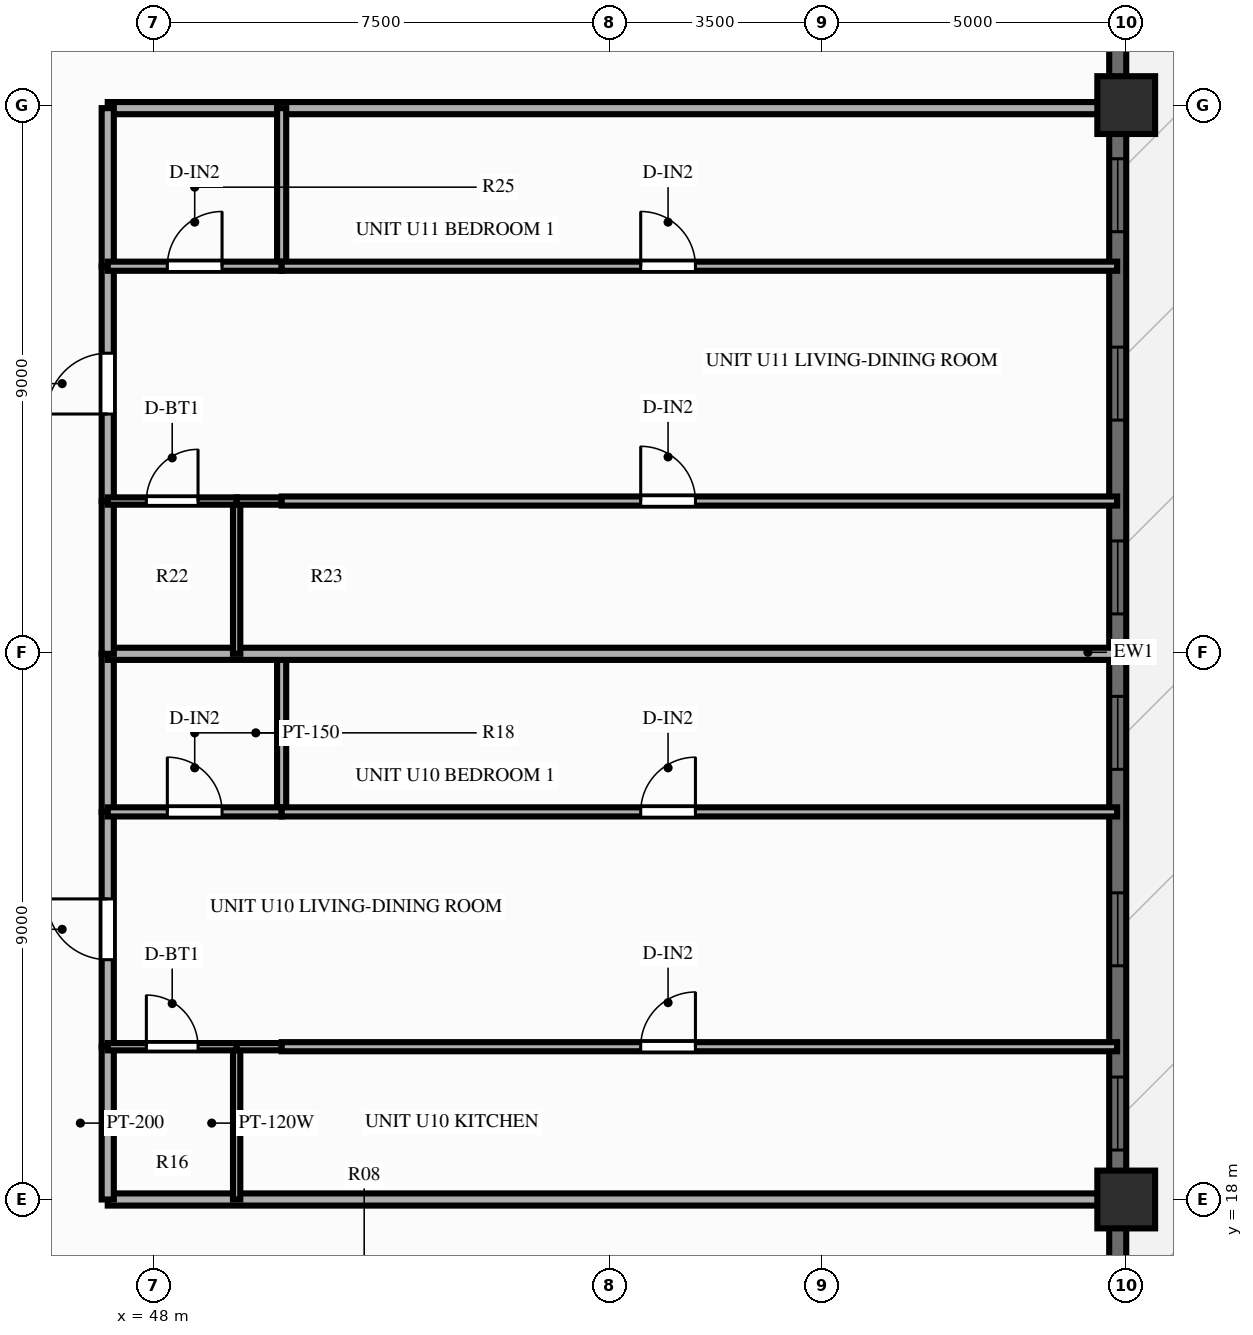
"""IFC4 building model, lengths in metres.
Left out: names, types, materials, properties, quantities, classifications, styles, units other than length and angle.
Written with IfcOpenShell. Run it as: python <this file> out.ifc"""

import sys

from ifc_helpers import new_model, si_unit, direction, frame, frame_2d, origin, origin_2d, place, context, subcontext, project, spatial, rectangle, extrude, source, transform, mapped, element, fill, save


model = new_model("IFC4")
c1 = context("Model", 3, precision=1e-05, world=origin(), true_north=direction((0.0, 1.0)))
c2 = subcontext(c1, "Body", "Model", "MODEL_VIEW")
j1 = project(units=[si_unit("LENGTHUNIT", "METRE"), si_unit("PLANEANGLEUNIT", "RADIAN")], contexts=[c1])
p1 = place(None, origin())
s1 = spatial("IfcSite", under=j1, at=p1, CompositionType="ELEMENT")
p2 = place(p1, origin())
s2 = spatial("IfcBuilding", under=s1, at=p2, CompositionType="ELEMENT")
p3 = place(p2, frame((0.0, 0.0, 77.85)))
s3 = spatial("IfcBuildingStorey", under=s2, at=p3, CompositionType="ELEMENT", Elevation=77.85)
m1 = source(origin(), c2, "Body", "SweptSolid", [
    extrude(rectangle(XDim=0.95, YDim=0.95, at=origin_2d()), origin(), (0.0, 0.0, 1.0), 3.0),
])
for number, where, z_axis, x_axis in (
    (1, (64.0, 18.0, 0.0), (0.0, 0.0, 1.0), (1.0, 0.0, 0.0)),
    (2, (64.0, 36.0, 0.0), (0.0, 0.0, 1.0), (1.0, 0.0, 0.0)),
):
    element("IfcColumn", number, at=place(p3, frame(where, z_axis=z_axis, x_axis=x_axis)), inside=s3, PredefinedType="COLUMN", context=c2, shape_type="MappedRepresentation", body=[
        mapped(m1, transform((0.0, 0.0, 0.0), scale=1.0)),
    ])
p4 = place(p3, frame((63.86, 7.2, 0.0), z_axis=(0.0, 0.0, 1.0), x_axis=(0.0, 1.0, 0.0)))
e3 = element("IfcWall", 3, at=p4, inside=s3, PredefinedType="SOLIDWALL", context=c2, shape_type="SweptSolid", body=[
    extrude(rectangle(XDim=39.6, YDim=0.28, at=frame_2d((19.8, 0.0))), origin(), (0.0, 0.0, 1.0), 2.28),
])
p5 = place(p4, frame((6.2, 0.0, 0.0), z_axis=(0.0, 0.0, 1.0), x_axis=(-1.0, 0.0, 0.0)))
e4 = element("IfcOpeningElement", 4, at=p5, cuts=e3, PredefinedType="OPENING", context=c2, shape_type="SweptSolid", body=[
    extrude(rectangle(XDim=1.6, YDim=2.15, at=frame_2d((0.8, 1.075))), frame((0.0, 0.152, 0.0), z_axis=(0.0, -1.0, 0.0), x_axis=(1.0, 0.0, 0.0)), (0.0, 0.0, 1.0), 0.304),
])
p6 = place(p4, frame((11.614, 0.0, 0.25)))
e5 = element("IfcOpeningElement", 5, at=p6, cuts=e3, PredefinedType="OPENING", context=c2, shape_type="SweptSolid", body=[
    extrude(rectangle(XDim=1.2, YDim=1.5, at=frame_2d((0.6, 0.75))), frame((0.0, 0.152, 0.0), z_axis=(0.0, -1.0, 0.0), x_axis=(1.0, 0.0, 0.0)), (0.0, 0.0, 1.0), 0.304),
])
p7 = place(p4, frame((14.644, 0.0, 0.25)))
e6 = element("IfcOpeningElement", 6, at=p7, cuts=e3, PredefinedType="OPENING", context=c2, shape_type="SweptSolid", body=[
    extrude(rectangle(XDim=1.2, YDim=1.5, at=frame_2d((0.6, 0.75))), frame((0.0, 0.152, 0.0), z_axis=(0.0, -1.0, 0.0), x_axis=(1.0, 0.0, 0.0)), (0.0, 0.0, 1.0), 0.304),
])
p8 = place(p4, frame((17.875, 0.0, 0.25)))
e7 = element("IfcOpeningElement", 7, at=p8, cuts=e3, PredefinedType="OPENING", context=c2, shape_type="SweptSolid", body=[
    extrude(rectangle(XDim=1.2, YDim=1.5, at=frame_2d((0.6, 0.75))), frame((0.0, 0.152, 0.0), z_axis=(0.0, -1.0, 0.0), x_axis=(1.0, 0.0, 0.0)), (0.0, 0.0, 1.0), 0.304),
])
p9 = place(p4, frame((20.431, 0.0, 0.25)))
e8 = element("IfcOpeningElement", 8, at=p9, cuts=e3, PredefinedType="OPENING", context=c2, shape_type="SweptSolid", body=[
    extrude(rectangle(XDim=1.2, YDim=1.5, at=frame_2d((0.6, 0.75))), frame((0.0, 0.152, 0.0), z_axis=(0.0, -1.0, 0.0), x_axis=(1.0, 0.0, 0.0)), (0.0, 0.0, 1.0), 0.304),
])
p10 = place(p4, frame((23.619, 0.0, 0.25)))
e9 = element("IfcOpeningElement", 9, at=p10, cuts=e3, PredefinedType="OPENING", context=c2, shape_type="SweptSolid", body=[
    extrude(rectangle(XDim=1.2, YDim=1.5, at=frame_2d((0.6, 0.75))), frame((0.0, 0.152, 0.0), z_axis=(0.0, -1.0, 0.0), x_axis=(1.0, 0.0, 0.0)), (0.0, 0.0, 1.0), 0.304),
])
p11 = place(p4, frame((26.718, 0.0, 0.25)))
e10 = element("IfcOpeningElement", 10, at=p11, cuts=e3, PredefinedType="OPENING", context=c2, shape_type="SweptSolid", body=[
    extrude(rectangle(XDim=1.2, YDim=1.5, at=frame_2d((0.6, 0.75))), frame((0.0, 0.152, 0.0), z_axis=(0.0, -1.0, 0.0), x_axis=(1.0, 0.0, 0.0)), (0.0, 0.0, 1.0), 0.304),
])
p12 = place(p4, frame((33.6, 0.0, 0.25)))
e11 = element("IfcOpeningElement", 11, at=p12, cuts=e3, PredefinedType="OPENING", context=c2, shape_type="SweptSolid", body=[
    extrude(rectangle(XDim=1.2, YDim=1.5, at=frame_2d((0.6, 0.75))), frame((0.0, 0.152, 0.0), z_axis=(0.0, -1.0, 0.0), x_axis=(1.0, 0.0, 0.0)), (0.0, 0.0, 1.0), 0.304),
])
for number, where, z_axis, x_axis in (
    (12, (47.25, 18.0, 0.0), (0.0, 0.0, 1.0), (1.0, 0.0, 0.0)),
    (13, (47.25, 35.95, 0.0), (0.0, 0.0, 1.0), (1.0, 0.0, 0.0)),
):
    element("IfcWall", number, at=place(p3, frame(where, z_axis=z_axis, x_axis=x_axis)), inside=s3, PredefinedType="PARTITIONING", context=c2, shape_type="SweptSolid", body=[
        extrude(rectangle(XDim=16.6, YDim=0.2, at=frame_2d((8.3, 0.0))), origin(), (0.0, 0.0, 1.0), 2.34),
    ])
p13 = place(p3, frame((47.25, 18.0, 0.0), z_axis=(0.0, 0.0, 1.0), x_axis=(0.0, 1.0, 0.0)))
e14 = element("IfcWall", 14, at=p13, inside=s3, PredefinedType="PARTITIONING", context=c2, shape_type="SweptSolid", body=[
    extrude(rectangle(XDim=2.513, YDim=0.2, at=frame_2d((1.256, 0.0))), origin(), (0.0, 0.0, 1.0), 2.79),
])
p14 = place(p3, frame((47.25, 20.513, 0.0), z_axis=(0.0, 0.0, 1.0), x_axis=(0.0, 1.0, 0.0)))
e15 = element("IfcWall", 15, at=p14, inside=s3, PredefinedType="PARTITIONING", context=c2, shape_type="SweptSolid", body=[
    extrude(rectangle(XDim=3.862, YDim=0.2, at=frame_2d((1.931, 0.0))), origin(), (0.0, 0.0, 1.0), 2.79),
])
p15 = place(p14, frame((1.431, 0.0, 0.0)))
e16 = element("IfcOpeningElement", 16, at=p15, cuts=e15, PredefinedType="OPENING", context=c2, shape_type="SweptSolid", body=[
    extrude(rectangle(XDim=1.0, YDim=2.15, at=frame_2d((0.5, 1.075))), frame((0.0, 0.112, 0.0), z_axis=(0.0, -1.0, 0.0), x_axis=(1.0, 0.0, 0.0)), (0.0, 0.0, 1.0), 0.224),
])
p16 = place(p3, frame((47.25, 24.375, 0.0), z_axis=(0.0, 0.0, 1.0), x_axis=(0.0, 1.0, 0.0)))
e17 = element("IfcWall", 17, at=p16, inside=s3, PredefinedType="PARTITIONING", context=c2, shape_type="SweptSolid", body=[
    extrude(rectangle(XDim=2.6, YDim=0.2, at=frame_2d((1.3, 0.0))), origin(), (0.0, 0.0, 1.0), 2.79),
])
p17 = place(p3, frame((49.37, 18.0, 0.0), z_axis=(0.0, 0.0, 1.0), x_axis=(0.0, 1.0, 0.0)))
e18 = element("IfcWall", 18, at=p17, inside=s3, PredefinedType="PARTITIONING", context=c2, shape_type="SweptSolid", body=[
    extrude(rectangle(XDim=2.513, YDim=0.12, at=frame_2d((1.256, 0.0))), origin(), (0.0, 0.0, 1.0), 2.79),
])
p18 = place(p3, frame((50.11, 24.375, 0.0), z_axis=(0.0, 0.0, 1.0), x_axis=(0.0, 1.0, 0.0)))
e19 = element("IfcWall", 19, at=p18, inside=s3, PredefinedType="PARTITIONING", context=c2, shape_type="SweptSolid", body=[
    extrude(rectangle(XDim=2.6, YDim=0.15, at=frame_2d((1.3, 0.0))), origin(), (0.0, 0.0, 1.0), 2.79),
])
p19 = place(p3, frame((47.25, 20.513, 0.0), z_axis=(0.0, 0.0, 1.0), x_axis=(1.0, 0.0, 0.0)))
e20 = element("IfcWall", 20, at=p19, inside=s3, PredefinedType="PARTITIONING", context=c2, shape_type="SweptSolid", body=[
    extrude(rectangle(XDim=2.12, YDim=0.12, at=frame_2d((1.06, 0.0))), origin(), (0.0, 0.0, 1.0), 2.79),
])
p20 = place(p19, frame((0.635, 0.0, 0.0)))
e21 = element("IfcOpeningElement", 21, at=p20, cuts=e20, PredefinedType="OPENING", context=c2, shape_type="SweptSolid", body=[
    extrude(rectangle(XDim=0.85, YDim=2.05, at=frame_2d((0.425, 1.025))), frame((0.0, 0.072, 0.0), z_axis=(0.0, -1.0, 0.0), x_axis=(1.0, 0.0, 0.0)), (0.0, 0.0, 1.0), 0.144),
])
p21 = place(p3, frame((49.37, 20.513, 0.0), z_axis=(0.0, 0.0, 1.0), x_axis=(1.0, 0.0, 0.0)))
e22 = element("IfcWall", 22, at=p21, inside=s3, PredefinedType="PARTITIONING", context=c2, shape_type="SweptSolid", body=[
    extrude(rectangle(XDim=0.74, YDim=0.12, at=frame_2d((0.37, 0.0))), origin(), (0.0, 0.0, 1.0), 2.79),
])
p22 = place(p3, frame((50.11, 20.513, 0.0), z_axis=(0.0, 0.0, 1.0), x_axis=(1.0, 0.0, 0.0)))
e23 = element("IfcWall", 23, at=p22, inside=s3, PredefinedType="PARTITIONING", context=c2, shape_type="SweptSolid", body=[
    extrude(rectangle(XDim=13.74, YDim=0.15, at=frame_2d((6.87, 0.0))), origin(), (0.0, 0.0, 1.0), 2.79),
])
p23 = place(p22, frame((5.905, 0.0, 0.0)))
e24 = element("IfcOpeningElement", 24, at=p23, cuts=e23, PredefinedType="OPENING", context=c2, shape_type="SweptSolid", body=[
    extrude(rectangle(XDim=0.9, YDim=2.1, at=frame_2d((0.45, 1.05))), frame((0.0, 0.087, 0.0), z_axis=(0.0, -1.0, 0.0), x_axis=(1.0, 0.0, 0.0)), (0.0, 0.0, 1.0), 0.174),
])
p24 = place(p3, frame((47.25, 24.375, 0.0), z_axis=(0.0, 0.0, 1.0), x_axis=(1.0, 0.0, 0.0)))
e25 = element("IfcWall", 25, at=p24, inside=s3, PredefinedType="PARTITIONING", context=c2, shape_type="SweptSolid", body=[
    extrude(rectangle(XDim=2.86, YDim=0.15, at=frame_2d((1.43, 0.0))), origin(), (0.0, 0.0, 1.0), 2.79),
])
p25 = place(p24, frame((0.98, 0.0, 0.0)))
e26 = element("IfcOpeningElement", 26, at=p25, cuts=e25, PredefinedType="OPENING", context=c2, shape_type="SweptSolid", body=[
    extrude(rectangle(XDim=0.9, YDim=2.1, at=frame_2d((0.45, 1.05))), frame((0.0, 0.087, 0.0), z_axis=(0.0, -1.0, 0.0), x_axis=(1.0, 0.0, 0.0)), (0.0, 0.0, 1.0), 0.174),
])
p26 = place(p3, frame((50.11, 24.375, 0.0), z_axis=(0.0, 0.0, 1.0), x_axis=(1.0, 0.0, 0.0)))
e27 = element("IfcWall", 27, at=p26, inside=s3, PredefinedType="PARTITIONING", context=c2, shape_type="SweptSolid", body=[
    extrude(rectangle(XDim=13.74, YDim=0.15, at=frame_2d((6.87, 0.0))), origin(), (0.0, 0.0, 1.0), 2.79),
])
p27 = place(p26, frame((5.905, 0.0, 0.0)))
e28 = element("IfcOpeningElement", 28, at=p27, cuts=e27, PredefinedType="OPENING", context=c2, shape_type="SweptSolid", body=[
    extrude(rectangle(XDim=0.9, YDim=2.1, at=frame_2d((0.45, 1.05))), frame((0.0, 0.087, 0.0), z_axis=(0.0, -1.0, 0.0), x_axis=(1.0, 0.0, 0.0)), (0.0, 0.0, 1.0), 0.174),
])
p28 = place(p3, frame((47.25, 26.975, 0.0), z_axis=(0.0, 0.0, 1.0), x_axis=(1.0, 0.0, 0.0)))
e29 = element("IfcWall", 29, at=p28, inside=s3, PredefinedType="PARTITIONING", context=c2, shape_type="SweptSolid", body=[
    extrude(rectangle(XDim=16.6, YDim=0.2, at=frame_2d((8.3, 0.0))), origin(), (0.0, 0.0, 1.0), 2.79),
])
p29 = place(p3, frame((47.25, 26.975, 0.0), z_axis=(0.0, 0.0, 1.0), x_axis=(0.0, 1.0, 0.0)))
e30 = element("IfcWall", 30, at=p29, inside=s3, PredefinedType="PARTITIONING", context=c2, shape_type="SweptSolid", body=[
    extrude(rectangle(XDim=2.513, YDim=0.2, at=frame_2d((1.256, 0.0))), origin(), (0.0, 0.0, 1.0), 2.79),
])
p30 = place(p3, frame((47.25, 29.488, 0.0), z_axis=(0.0, 0.0, 1.0), x_axis=(0.0, 1.0, 0.0)))
e31 = element("IfcWall", 31, at=p30, inside=s3, PredefinedType="PARTITIONING", context=c2, shape_type="SweptSolid", body=[
    extrude(rectangle(XDim=3.862, YDim=0.2, at=frame_2d((1.931, 0.0))), origin(), (0.0, 0.0, 1.0), 2.79),
])
p31 = place(p30, frame((1.431, 0.0, 0.0)))
e32 = element("IfcOpeningElement", 32, at=p31, cuts=e31, PredefinedType="OPENING", context=c2, shape_type="SweptSolid", body=[
    extrude(rectangle(XDim=1.0, YDim=2.15, at=frame_2d((0.5, 1.075))), frame((0.0, 0.112, 0.0), z_axis=(0.0, -1.0, 0.0), x_axis=(1.0, 0.0, 0.0)), (0.0, 0.0, 1.0), 0.224),
])
p32 = place(p3, frame((47.25, 33.35, 0.0), z_axis=(0.0, 0.0, 1.0), x_axis=(0.0, 1.0, 0.0)))
e33 = element("IfcWall", 33, at=p32, inside=s3, PredefinedType="PARTITIONING", context=c2, shape_type="SweptSolid", body=[
    extrude(rectangle(XDim=2.6, YDim=0.2, at=frame_2d((1.3, 0.0))), origin(), (0.0, 0.0, 1.0), 2.79),
])
p33 = place(p3, frame((49.37, 26.975, 0.0), z_axis=(0.0, 0.0, 1.0), x_axis=(0.0, 1.0, 0.0)))
e34 = element("IfcWall", 34, at=p33, inside=s3, PredefinedType="PARTITIONING", context=c2, shape_type="SweptSolid", body=[
    extrude(rectangle(XDim=2.513, YDim=0.12, at=frame_2d((1.256, 0.0))), origin(), (0.0, 0.0, 1.0), 2.79),
])
p34 = place(p3, frame((50.11, 33.35, 0.0), z_axis=(0.0, 0.0, 1.0), x_axis=(0.0, 1.0, 0.0)))
e35 = element("IfcWall", 35, at=p34, inside=s3, PredefinedType="PARTITIONING", context=c2, shape_type="SweptSolid", body=[
    extrude(rectangle(XDim=2.6, YDim=0.15, at=frame_2d((1.3, 0.0))), origin(), (0.0, 0.0, 1.0), 2.79),
])
p35 = place(p3, frame((47.25, 29.488, 0.0), z_axis=(0.0, 0.0, 1.0), x_axis=(1.0, 0.0, 0.0)))
e36 = element("IfcWall", 36, at=p35, inside=s3, PredefinedType="PARTITIONING", context=c2, shape_type="SweptSolid", body=[
    extrude(rectangle(XDim=2.12, YDim=0.12, at=frame_2d((1.06, 0.0))), origin(), (0.0, 0.0, 1.0), 2.79),
])
p36 = place(p35, frame((0.635, 0.0, 0.0)))
e37 = element("IfcOpeningElement", 37, at=p36, cuts=e36, PredefinedType="OPENING", context=c2, shape_type="SweptSolid", body=[
    extrude(rectangle(XDim=0.85, YDim=2.05, at=frame_2d((0.425, 1.025))), frame((0.0, 0.072, 0.0), z_axis=(0.0, -1.0, 0.0), x_axis=(1.0, 0.0, 0.0)), (0.0, 0.0, 1.0), 0.144),
])
p37 = place(p3, frame((49.37, 29.488, 0.0), z_axis=(0.0, 0.0, 1.0), x_axis=(1.0, 0.0, 0.0)))
e38 = element("IfcWall", 38, at=p37, inside=s3, PredefinedType="PARTITIONING", context=c2, shape_type="SweptSolid", body=[
    extrude(rectangle(XDim=0.74, YDim=0.12, at=frame_2d((0.37, 0.0))), origin(), (0.0, 0.0, 1.0), 2.79),
])
p38 = place(p3, frame((50.11, 29.488, 0.0), z_axis=(0.0, 0.0, 1.0), x_axis=(1.0, 0.0, 0.0)))
e39 = element("IfcWall", 39, at=p38, inside=s3, PredefinedType="PARTITIONING", context=c2, shape_type="SweptSolid", body=[
    extrude(rectangle(XDim=13.74, YDim=0.15, at=frame_2d((6.87, 0.0))), origin(), (0.0, 0.0, 1.0), 2.79),
])
p39 = place(p38, frame((5.905, 0.0, 0.0)))
e40 = element("IfcOpeningElement", 40, at=p39, cuts=e39, PredefinedType="OPENING", context=c2, shape_type="SweptSolid", body=[
    extrude(rectangle(XDim=0.9, YDim=2.1, at=frame_2d((0.45, 1.05))), frame((0.0, 0.087, 0.0), z_axis=(0.0, -1.0, 0.0), x_axis=(1.0, 0.0, 0.0)), (0.0, 0.0, 1.0), 0.174),
])
p40 = place(p3, frame((47.25, 33.35, 0.0), z_axis=(0.0, 0.0, 1.0), x_axis=(1.0, 0.0, 0.0)))
e41 = element("IfcWall", 41, at=p40, inside=s3, PredefinedType="PARTITIONING", context=c2, shape_type="SweptSolid", body=[
    extrude(rectangle(XDim=2.86, YDim=0.15, at=frame_2d((1.43, 0.0))), origin(), (0.0, 0.0, 1.0), 2.79),
])
p41 = place(p40, frame((0.98, 0.0, 0.0)))
e42 = element("IfcOpeningElement", 42, at=p41, cuts=e41, PredefinedType="OPENING", context=c2, shape_type="SweptSolid", body=[
    extrude(rectangle(XDim=0.9, YDim=2.1, at=frame_2d((0.45, 1.05))), frame((0.0, 0.087, 0.0), z_axis=(0.0, -1.0, 0.0), x_axis=(1.0, 0.0, 0.0)), (0.0, 0.0, 1.0), 0.174),
])
p42 = place(p3, frame((50.11, 33.35, 0.0), z_axis=(0.0, 0.0, 1.0), x_axis=(1.0, 0.0, 0.0)))
e43 = element("IfcWall", 43, at=p42, inside=s3, PredefinedType="PARTITIONING", context=c2, shape_type="SweptSolid", body=[
    extrude(rectangle(XDim=13.74, YDim=0.15, at=frame_2d((6.87, 0.0))), origin(), (0.0, 0.0, 1.0), 2.79),
])
p43 = place(p42, frame((5.905, 0.0, 0.0)))
e44 = element("IfcOpeningElement", 44, at=p43, cuts=e43, PredefinedType="OPENING", context=c2, shape_type="SweptSolid", body=[
    extrude(rectangle(XDim=0.9, YDim=2.1, at=frame_2d((0.45, 1.05))), frame((0.0, 0.087, 0.0), z_axis=(0.0, -1.0, 0.0), x_axis=(1.0, 0.0, 0.0)), (0.0, 0.0, 1.0), 0.174),
])
m2 = source(origin(), c2, "Body", "SweptSolid", [
    extrude(rectangle(XDim=1.2, YDim=1.5, at=frame_2d((0.6, 0.75))), frame((0.0, 0.03, 0.0), z_axis=(0.0, -1.0, 0.0), x_axis=(1.0, 0.0, 0.0)), (0.0, 0.0, 1.0), 0.06),
])
p44 = place(p6, origin())
e45 = element("IfcWindow", 45, at=p44, inside=s3, PartitioningType="SINGLE_PANEL", PredefinedType="WINDOW", context=c2, shape_type="MappedRepresentation", body=[
    mapped(m2, transform((0.0, 0.0, 0.0), scale=1.0)),
])
fill(e5, e45)
p45 = place(p7, origin())
e46 = element("IfcWindow", 46, at=p45, inside=s3, PartitioningType="SINGLE_PANEL", PredefinedType="WINDOW", context=c2, shape_type="MappedRepresentation", body=[
    mapped(m2, transform((0.0, 0.0, 0.0), scale=1.0)),
])
fill(e6, e46)
p46 = place(p8, origin())
e47 = element("IfcWindow", 47, at=p46, inside=s3, PartitioningType="SINGLE_PANEL", PredefinedType="WINDOW", context=c2, shape_type="MappedRepresentation", body=[
    mapped(m2, transform((0.0, 0.0, 0.0), scale=1.0)),
])
fill(e7, e47)
p47 = place(p9, origin())
e48 = element("IfcWindow", 48, at=p47, inside=s3, PartitioningType="SINGLE_PANEL", PredefinedType="WINDOW", context=c2, shape_type="MappedRepresentation", body=[
    mapped(m2, transform((0.0, 0.0, 0.0), scale=1.0)),
])
fill(e8, e48)
p48 = place(p10, origin())
e49 = element("IfcWindow", 49, at=p48, inside=s3, PartitioningType="SINGLE_PANEL", PredefinedType="WINDOW", context=c2, shape_type="MappedRepresentation", body=[
    mapped(m2, transform((0.0, 0.0, 0.0), scale=1.0)),
])
fill(e9, e49)
p49 = place(p11, origin())
e50 = element("IfcWindow", 50, at=p49, inside=s3, PartitioningType="SINGLE_PANEL", PredefinedType="WINDOW", context=c2, shape_type="MappedRepresentation", body=[
    mapped(m2, transform((0.0, 0.0, 0.0), scale=1.0)),
])
fill(e10, e50)
m3 = source(origin(), c2, "Body", "SweptSolid", [
    extrude(rectangle(XDim=1.0, YDim=2.15, at=frame_2d((0.5, 1.075))), frame((0.0, 0.025, 0.0), z_axis=(0.0, -1.0, 0.0), x_axis=(1.0, 0.0, 0.0)), (0.0, 0.0, 1.0), 0.05),
])
p50 = place(p15, origin())
e51 = element("IfcDoor", 51, at=p50, inside=s3, OperationType="SINGLE_SWING_RIGHT", PredefinedType="DOOR", context=c2, shape_type="MappedRepresentation", body=[
    mapped(m3, transform((0.0, 0.0, 0.0), scale=1.0)),
])
fill(e16, e51)
m4 = source(origin(), c2, "Body", "SweptSolid", [
    extrude(rectangle(XDim=0.85, YDim=2.05, at=frame_2d((0.425, 1.025))), frame((0.0, 0.025, 0.0), z_axis=(0.0, -1.0, 0.0), x_axis=(1.0, 0.0, 0.0)), (0.0, 0.0, 1.0), 0.05),
])
p51 = place(p20, origin())
e52 = element("IfcDoor", 52, at=p51, inside=s3, OperationType="SINGLE_SWING_LEFT", PredefinedType="DOOR", context=c2, shape_type="MappedRepresentation", body=[
    mapped(m4, transform((0.0, 0.0, 0.0), scale=1.0)),
])
fill(e21, e52)
m5 = source(origin(), c2, "Body", "SweptSolid", [
    extrude(rectangle(XDim=0.9, YDim=2.1, at=frame_2d((0.45, 1.05))), frame((0.0, 0.025, 0.0), z_axis=(0.0, -1.0, 0.0), x_axis=(1.0, 0.0, 0.0)), (0.0, 0.0, 1.0), 0.05),
])
p52 = place(p23, origin())
e53 = element("IfcDoor", 53, at=p52, inside=s3, OperationType="SINGLE_SWING_RIGHT", PredefinedType="DOOR", context=c2, shape_type="MappedRepresentation", body=[
    mapped(m5, transform((0.0, 0.0, 0.0), scale=1.0)),
])
fill(e24, e53)
p53 = place(p25, origin())
e54 = element("IfcDoor", 54, at=p53, inside=s3, OperationType="SINGLE_SWING_LEFT", PredefinedType="DOOR", context=c2, shape_type="MappedRepresentation", body=[
    mapped(m5, transform((0.0, 0.0, 0.0), scale=1.0)),
])
fill(e26, e54)
p54 = place(p27, origin())
e55 = element("IfcDoor", 55, at=p54, inside=s3, OperationType="SINGLE_SWING_RIGHT", PredefinedType="DOOR", context=c2, shape_type="MappedRepresentation", body=[
    mapped(m5, transform((0.0, 0.0, 0.0), scale=1.0)),
])
fill(e28, e55)
p55 = place(p31, origin())
e56 = element("IfcDoor", 56, at=p55, inside=s3, OperationType="SINGLE_SWING_LEFT", PredefinedType="DOOR", context=c2, shape_type="MappedRepresentation", body=[
    mapped(m3, transform((0.0, 0.0, 0.0), scale=1.0)),
])
fill(e32, e56)
p56 = place(p36, origin())
e57 = element("IfcDoor", 57, at=p56, inside=s3, OperationType="SINGLE_SWING_RIGHT", PredefinedType="DOOR", context=c2, shape_type="MappedRepresentation", body=[
    mapped(m4, transform((0.0, 0.0, 0.0), scale=1.0)),
])
fill(e37, e57)
p57 = place(p39, origin())
e58 = element("IfcDoor", 58, at=p57, inside=s3, OperationType="SINGLE_SWING_LEFT", PredefinedType="DOOR", context=c2, shape_type="MappedRepresentation", body=[
    mapped(m5, transform((0.0, 0.0, 0.0), scale=1.0)),
])
fill(e40, e58)
p58 = place(p41, origin())
e59 = element("IfcDoor", 59, at=p58, inside=s3, OperationType="SINGLE_SWING_RIGHT", PredefinedType="DOOR", context=c2, shape_type="MappedRepresentation", body=[
    mapped(m5, transform((0.0, 0.0, 0.0), scale=1.0)),
])
fill(e42, e59)
p59 = place(p43, origin())
e60 = element("IfcDoor", 60, at=p59, inside=s3, OperationType="SINGLE_SWING_LEFT", PredefinedType="DOOR", context=c2, shape_type="MappedRepresentation", body=[
    mapped(m5, transform((0.0, 0.0, 0.0), scale=1.0)),
])
fill(e44, e60)
save(model, sys.argv[1])
